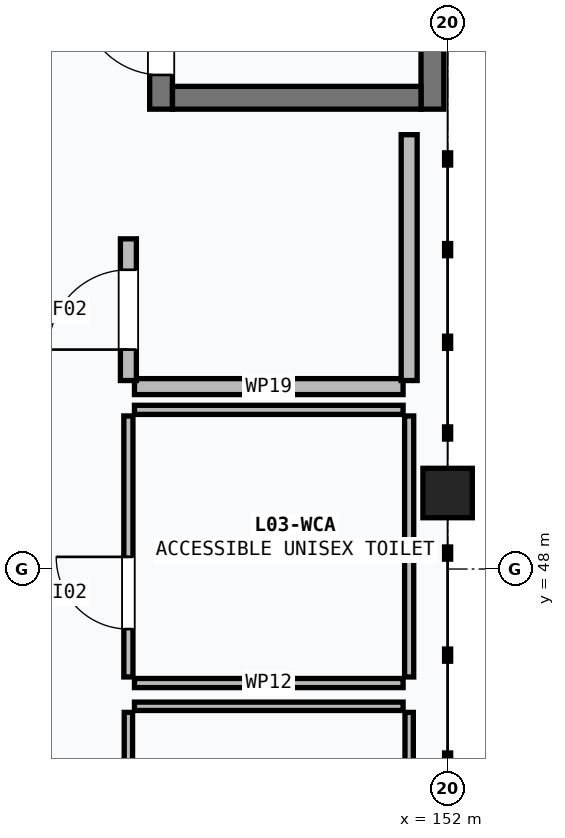
"""IFC4 building model, lengths in metres.
Left out: names, types, materials, properties, quantities, classifications, styles, units other than length and angle.
Written with IfcOpenShell. Run it as: python <this file> out.ifc"""

import sys

from ifc_helpers import new_model, si_unit, direction, frame, frame_2d, origin, origin_2d, place, context, subcontext, project, spatial, rectangle, extrude, element, fill, save


model = new_model("IFC4")
c1 = context("Model", 3, precision=1e-05, world=origin(), true_north=direction((0.0, 1.0)))
c2 = subcontext(c1, "Body", "Model", "MODEL_VIEW")
j1 = project(units=[si_unit("LENGTHUNIT", "METRE"), si_unit("PLANEANGLEUNIT", "RADIAN")], contexts=[c1])
p1 = place(None, origin())
s1 = spatial("IfcSite", under=j1, at=p1, CompositionType="ELEMENT")
p2 = place(p1, origin())
s2 = spatial("IfcBuilding", under=s1, at=p2, CompositionType="ELEMENT")
p3 = place(p2, frame((0.0, 0.0, 12.0)))
s3 = spatial("IfcBuildingStorey", under=s2, at=p3, CompositionType="ELEMENT", Elevation=12.0)
p4 = place(p3, frame((152.0, 49.0, 0.0), z_axis=(0.0, 0.0, 1.0), x_axis=(1.0, 0.0, 0.0)))
e1 = element("IfcColumn", 1, at=p4, inside=s3, PredefinedType="COLUMN", context=c2, shape_type="SweptSolid", body=[
    extrude(rectangle(XDim=0.65, YDim=0.65, at=origin_2d()), origin(), (0.0, 0.0, 1.0), 3.6),
])
p5 = place(p3, frame((148.23, 54.05, 0.0), z_axis=(0.0, 0.0, 1.0), x_axis=(0.0, 1.0, 0.0)))
e2 = element("IfcWall", 2, at=p5, inside=s3, PredefinedType="SHEAR", context=c2, shape_type="SweptSolid", body=[
    extrude(rectangle(XDim=9.9, YDim=0.3, at=frame_2d((4.95, 0.0))), origin(), (0.0, 0.0, 1.0), 3.6),
])
p6 = place(p5, frame((0.45, 0.0, 0.0)))
e3 = element("IfcOpeningElement", 3, at=p6, cuts=e2, PredefinedType="OPENING", context=c2, shape_type="SweptSolid", body=[
    extrude(rectangle(XDim=1.05, YDim=2.15, at=frame_2d((0.525, 1.075))), frame((0.0, 0.16, 0.0), z_axis=(0.0, -1.0, 0.0), x_axis=(1.0, 0.0, 0.0)), (0.0, 0.0, 1.0), 0.32),
])
p7 = place(p3, frame((151.8, 63.95, 0.0), z_axis=(0.0, 0.0, 1.0), x_axis=(0.0, -1.0, 0.0)))
e4 = element("IfcWall", 4, at=p7, inside=s3, PredefinedType="SHEAR", context=c2, shape_type="SweptSolid", body=[
    extrude(rectangle(XDim=9.9, YDim=0.3, at=frame_2d((4.95, 0.0))), origin(), (0.0, 0.0, 1.0), 3.6),
])
p8 = place(p3, frame((151.65, 54.2, 0.0), z_axis=(0.0, 0.0, 1.0), x_axis=(-1.0, 0.0, 0.0)))
e5 = element("IfcWall", 5, at=p8, inside=s3, PredefinedType="SHEAR", context=c2, shape_type="SweptSolid", body=[
    extrude(rectangle(XDim=3.27, YDim=0.3, at=frame_2d((1.635, 0.0))), origin(), (0.0, 0.0, 1.0), 3.6),
])
p9 = place(p3, frame((147.88, 46.194, 0.0), z_axis=(0.0, 0.0, 1.0), x_axis=(1.0, 0.0, 0.0)))
e6 = element("IfcWall", 6, at=p9, inside=s3, PredefinedType="PARTITIONING", context=c2, shape_type="SweptSolid", body=[
    extrude(rectangle(XDim=3.534, YDim=0.11, at=frame_2d((1.767, 0.0))), origin(), (0.0, 0.0, 1.0), 3.345),
])
p10 = place(p3, frame((147.8, 42.68, 0.0), z_axis=(0.0, 0.0, 1.0), x_axis=(0.0, 1.0, 0.0)))
e7 = element("IfcWall", 7, at=p10, inside=s3, PredefinedType="PARTITIONING", context=c2, shape_type="SweptSolid", body=[
    extrude(rectangle(XDim=3.434, YDim=0.11, at=frame_2d((1.717, 0.0))), origin(), (0.0, 0.0, 1.0), 2.755),
])
p11 = place(p10, frame((1.267, 0.0, 0.0)))
e8 = element("IfcOpeningElement", 8, at=p11, cuts=e7, PredefinedType="OPENING", context=c2, shape_type="SweptSolid", body=[
    extrude(rectangle(XDim=0.9, YDim=2.1, at=frame_2d((0.45, 1.05))), frame((0.0, 0.065, 0.0), z_axis=(0.0, -1.0, 0.0), x_axis=(1.0, 0.0, 0.0)), (0.0, 0.0, 1.0), 0.13),
])
p12 = place(p3, frame((151.494, 42.68, 0.0), z_axis=(0.0, 0.0, 1.0), x_axis=(0.0, 1.0, 0.0)))
e9 = element("IfcWall", 9, at=p12, inside=s3, PredefinedType="PARTITIONING", context=c2, shape_type="SweptSolid", body=[
    extrude(rectangle(XDim=3.434, YDim=0.11, at=frame_2d((1.717, 0.0))), origin(), (0.0, 0.0, 1.0), 2.755),
])
for number, where, z_axis, x_axis in (
    (10, (147.88, 46.5, 0.0), (0.0, 0.0, 1.0), (1.0, 0.0, 0.0)),
    (11, (147.88, 50.094, 0.0), (0.0, 0.0, 1.0), (1.0, 0.0, 0.0)),
):
    element("IfcWall", number, at=place(p3, frame(where, z_axis=z_axis, x_axis=x_axis)), inside=s3, PredefinedType="PARTITIONING", context=c2, shape_type="SweptSolid", body=[
        extrude(rectangle(XDim=3.534, YDim=0.12, at=frame_2d((1.767, 0.0))), origin(), (0.0, 0.0, 1.0), 3.345),
    ])
p13 = place(p3, frame((147.8, 46.58, 0.0), z_axis=(0.0, 0.0, 1.0), x_axis=(0.0, 1.0, 0.0)))
e12 = element("IfcWall", 12, at=p13, inside=s3, PredefinedType="PARTITIONING", context=c2, shape_type="SweptSolid", body=[
    extrude(rectangle(XDim=3.434, YDim=0.12, at=frame_2d((1.717, 0.0))), origin(), (0.0, 0.0, 1.0), 2.245),
])
p14 = place(p13, frame((0.63, 0.0, 0.0)))
e13 = element("IfcOpeningElement", 13, at=p14, cuts=e12, PredefinedType="OPENING", context=c2, shape_type="SweptSolid", body=[
    extrude(rectangle(XDim=0.95, YDim=2.1, at=frame_2d((0.475, 1.05))), frame((0.0, 0.07, 0.0), z_axis=(0.0, -1.0, 0.0), x_axis=(1.0, 0.0, 0.0)), (0.0, 0.0, 1.0), 0.14),
])
p15 = place(p3, frame((151.494, 46.58, 0.0), z_axis=(0.0, 0.0, 1.0), x_axis=(0.0, 1.0, 0.0)))
e14 = element("IfcWall", 14, at=p15, inside=s3, PredefinedType="PARTITIONING", context=c2, shape_type="SweptSolid", body=[
    extrude(rectangle(XDim=3.434, YDim=0.12, at=frame_2d((1.717, 0.0))), origin(), (0.0, 0.0, 1.0), 2.245),
])
p16 = place(p3, frame((147.88, 50.4, 0.0), z_axis=(0.0, 0.0, 1.0), x_axis=(1.0, 0.0, 0.0)))
e15 = element("IfcWall", 15, at=p16, inside=s3, PredefinedType="PARTITIONING", context=c2, shape_type="SweptSolid", body=[
    extrude(rectangle(XDim=3.534, YDim=0.21, at=frame_2d((1.767, 0.0))), origin(), (0.0, 0.0, 1.0), 3.345),
])
p17 = place(p3, frame((147.8, 50.48, 0.0), z_axis=(0.0, 0.0, 1.0), x_axis=(0.0, 1.0, 0.0)))
e16 = element("IfcWall", 16, at=p17, inside=s3, PredefinedType="PARTITIONING", context=c2, shape_type="SweptSolid", body=[
    extrude(rectangle(XDim=1.864, YDim=0.21, at=frame_2d((0.932, 0.0))), origin(), (0.0, 0.0, 1.0), 2.755),
])
p18 = place(p17, frame((0.407, 0.0, 0.0)))
e17 = element("IfcOpeningElement", 17, at=p18, cuts=e16, PredefinedType="OPENING", context=c2, shape_type="SweptSolid", body=[
    extrude(rectangle(XDim=1.05, YDim=2.15, at=frame_2d((0.525, 1.075))), frame((0.0, 0.115, 0.0), z_axis=(0.0, -1.0, 0.0), x_axis=(1.0, 0.0, 0.0)), (0.0, 0.0, 1.0), 0.23),
])
p19 = place(p3, frame((151.494, 50.48, 0.0), z_axis=(0.0, 0.0, 1.0), x_axis=(0.0, 1.0, 0.0)))
e18 = element("IfcWall", 18, at=p19, inside=s3, PredefinedType="PARTITIONING", context=c2, shape_type="SweptSolid", body=[
    extrude(rectangle(XDim=3.234, YDim=0.21, at=frame_2d((1.617, 0.0))), origin(), (0.0, 0.0, 1.0), 2.755),
])
p20 = place(p6, origin())
e19 = element("IfcDoor", 19, at=p20, inside=s3, OperationType="SINGLE_SWING_RIGHT", PredefinedType="DOOR", context=c2, shape_type="SweptSolid", body=[
    extrude(rectangle(XDim=1.05, YDim=2.15, at=frame_2d((0.525, 1.075))), frame((0.0, 0.025, 0.0), z_axis=(0.0, -1.0, 0.0), x_axis=(1.0, 0.0, 0.0)), (0.0, 0.0, 1.0), 0.05),
])
fill(e3, e19)
p21 = place(p14, origin())
e20 = element("IfcDoor", 20, at=p21, inside=s3, OperationType="SINGLE_SWING_RIGHT", PredefinedType="DOOR", context=c2, shape_type="SweptSolid", body=[
    extrude(rectangle(XDim=0.95, YDim=2.1, at=frame_2d((0.475, 1.05))), frame((0.0, 0.025, 0.0), z_axis=(0.0, -1.0, 0.0), x_axis=(1.0, 0.0, 0.0)), (0.0, 0.0, 1.0), 0.05),
])
fill(e13, e20)
p22 = place(p18, origin())
e21 = element("IfcDoor", 21, at=p22, inside=s3, OperationType="SINGLE_SWING_LEFT", PredefinedType="DOOR", context=c2, shape_type="SweptSolid", body=[
    extrude(rectangle(XDim=1.05, YDim=2.15, at=frame_2d((0.525, 1.075))), frame((0.0, 0.025, 0.0), z_axis=(0.0, -1.0, 0.0), x_axis=(1.0, 0.0, 0.0)), (0.0, 0.0, 1.0), 0.05),
])
fill(e17, e21)
save(model, sys.argv[1])
